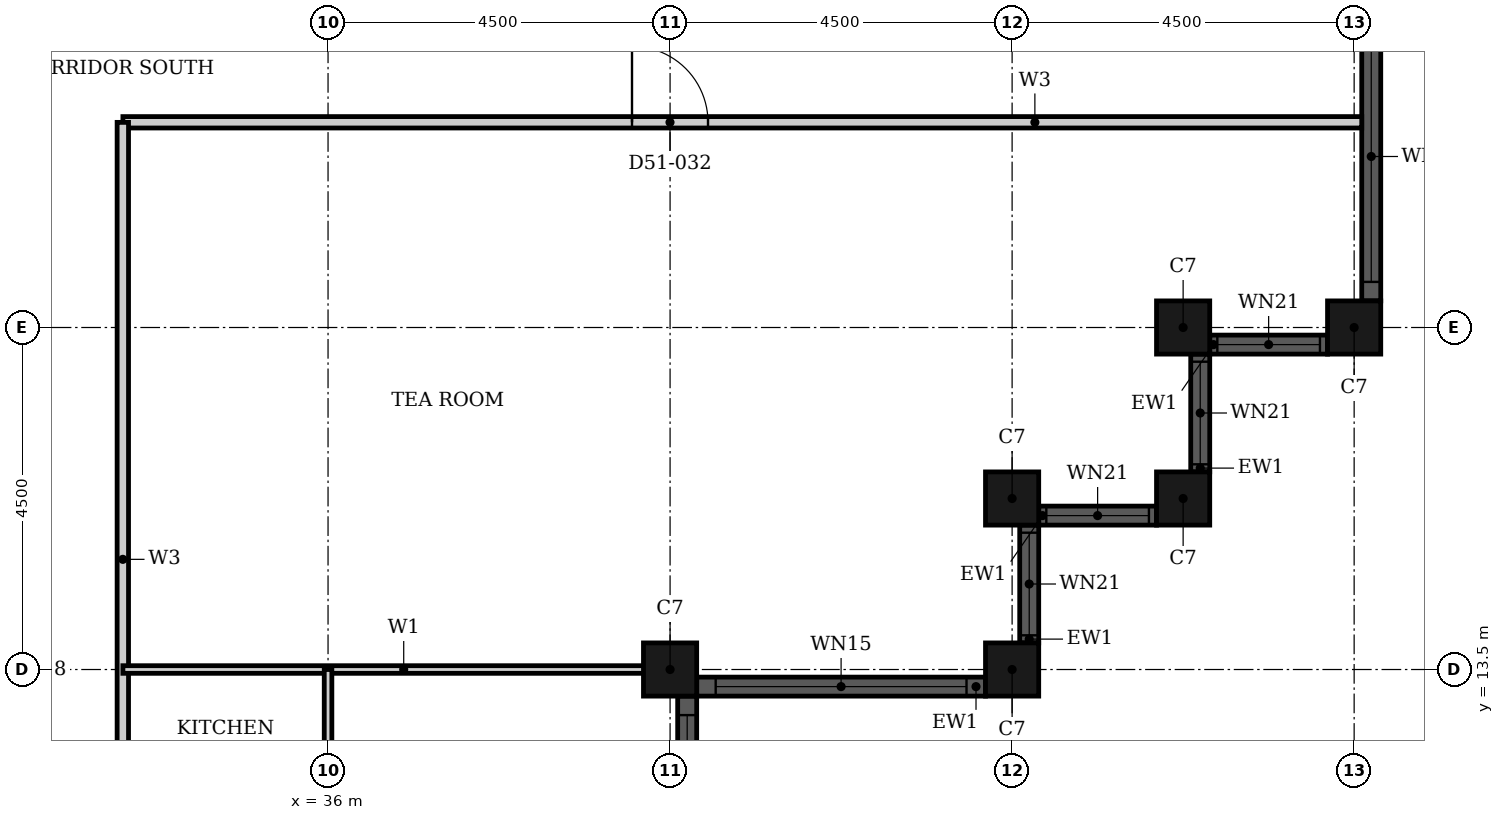
"""IFC4 building model, lengths in metres.
Left out: names, types, materials, properties, quantities, classifications, styles, units other than length and angle.
Written with IfcOpenShell. Run it as: python <this file> out.ifc"""

import sys

from ifc_helpers import new_model, si_unit, direction, frame, frame_2d, origin, origin_2d, place, context, subcontext, project, spatial, rectangle, hollow_rectangle, extrude, element, fill, save


model = new_model("IFC4")
c1 = context("Model", 3, precision=1e-05, world=origin(), true_north=direction((0.0, 1.0)))
c2 = subcontext(c1, "Body", "Model", "MODEL_VIEW")
j1 = project(units=[si_unit("LENGTHUNIT", "METRE"), si_unit("PLANEANGLEUNIT", "RADIAN")], contexts=[c1])
p1 = place(None, origin())
s1 = spatial("IfcSite", under=j1, at=p1, CompositionType="ELEMENT")
p2 = place(p1, origin())
s2 = spatial("IfcBuilding", under=s1, at=p2, CompositionType="ELEMENT")
p3 = place(p2, frame((0.0, 0.0, 203.5)))
s3 = spatial("IfcBuildingStorey", under=s2, at=p3, CompositionType="ELEMENT", Elevation=203.5)
for number, where, z_axis, x_axis in (
    (1, (40.5, 13.5, 0.0), (0.0, 0.0, 1.0), (1.0, 0.0, 0.0)),
    (2, (45.0, 13.5, 0.0), (0.0, 0.0, 1.0), (1.0, 0.0, 0.0)),
    (3, (45.0, 15.75, 0.0), (0.0, 0.0, 1.0), (1.0, 0.0, 0.0)),
    (4, (47.25, 15.75, 0.0), (0.0, 0.0, 1.0), (1.0, 0.0, 0.0)),
    (5, (47.25, 18.0, 0.0), (0.0, 0.0, 1.0), (1.0, 0.0, 0.0)),
    (6, (49.5, 18.0, 0.0), (0.0, 0.0, 1.0), (1.0, 0.0, 0.0)),
):
    element("IfcColumn", number, at=place(p3, frame(where, z_axis=z_axis, x_axis=x_axis)), inside=s3, PredefinedType="COLUMN", context=c2, shape_type="SweptSolid", body=[
        extrude(hollow_rectangle(XDim=0.7, YDim=0.7, WallThickness=0.022, at=origin_2d()), origin(), (0.0, 0.0, 1.0), 3.7),
    ])
p4 = place(p3, frame((40.85, 13.275, 0.0), z_axis=(0.0, 0.0, 1.0), x_axis=(1.0, 0.0, 0.0)))
e7 = element("IfcWall", 7, at=p4, inside=s3, PredefinedType="SOLIDWALL", context=c2, shape_type="SweptSolid", body=[
    extrude(rectangle(XDim=3.8, YDim=0.25, at=frame_2d((1.9, 0.0))), origin(), (0.0, 0.0, 1.0), 3.7),
])
p5 = place(p4, frame((0.25, 0.0, 0.45)))
e8 = element("IfcOpeningElement", 8, at=p5, cuts=e7, PredefinedType="OPENING", context=c2, shape_type="SweptSolid", body=[
    extrude(rectangle(XDim=3.3, YDim=2.3, at=frame_2d((1.65, 1.15))), frame((0.0, 0.135, 0.0), z_axis=(0.0, -1.0, 0.0), x_axis=(1.0, 0.0, 0.0)), (0.0, 0.0, 1.0), 0.27),
])
p6 = place(p3, frame((45.225, 13.85, 0.0), z_axis=(0.0, 0.0, 1.0), x_axis=(0.0, 1.0, 0.0)))
e9 = element("IfcWall", 9, at=p6, inside=s3, PredefinedType="SOLIDWALL", context=c2, shape_type="SweptSolid", body=[
    extrude(rectangle(XDim=1.55, YDim=0.25, at=frame_2d((0.775, 0.0))), origin(), (0.0, 0.0, 1.0), 3.7),
])
p7 = place(p6, frame((0.1, 0.0, 0.9)))
e10 = element("IfcOpeningElement", 10, at=p7, cuts=e9, PredefinedType="OPENING", context=c2, shape_type="SweptSolid", body=[
    extrude(rectangle(XDim=1.35, YDim=1.85, at=frame_2d((0.675, 0.925))), frame((0.0, 0.135, 0.0), z_axis=(0.0, -1.0, 0.0), x_axis=(1.0, 0.0, 0.0)), (0.0, 0.0, 1.0), 0.27),
])
p8 = place(p3, frame((45.35, 15.525, 0.0), z_axis=(0.0, 0.0, 1.0), x_axis=(1.0, 0.0, 0.0)))
e11 = element("IfcWall", 11, at=p8, inside=s3, PredefinedType="SOLIDWALL", context=c2, shape_type="SweptSolid", body=[
    extrude(rectangle(XDim=1.55, YDim=0.25, at=frame_2d((0.775, 0.0))), origin(), (0.0, 0.0, 1.0), 3.7),
])
p9 = place(p8, frame((0.1, 0.0, 0.9)))
e12 = element("IfcOpeningElement", 12, at=p9, cuts=e11, PredefinedType="OPENING", context=c2, shape_type="SweptSolid", body=[
    extrude(rectangle(XDim=1.35, YDim=1.85, at=frame_2d((0.675, 0.925))), frame((0.0, 0.135, 0.0), z_axis=(0.0, -1.0, 0.0), x_axis=(1.0, 0.0, 0.0)), (0.0, 0.0, 1.0), 0.27),
])
p10 = place(p3, frame((47.475, 16.1, 0.0), z_axis=(0.0, 0.0, 1.0), x_axis=(0.0, 1.0, 0.0)))
e13 = element("IfcWall", 13, at=p10, inside=s3, PredefinedType="SOLIDWALL", context=c2, shape_type="SweptSolid", body=[
    extrude(rectangle(XDim=1.55, YDim=0.25, at=frame_2d((0.775, 0.0))), origin(), (0.0, 0.0, 1.0), 3.7),
])
p11 = place(p10, frame((0.1, 0.0, 0.9)))
e14 = element("IfcOpeningElement", 14, at=p11, cuts=e13, PredefinedType="OPENING", context=c2, shape_type="SweptSolid", body=[
    extrude(rectangle(XDim=1.35, YDim=1.85, at=frame_2d((0.675, 0.925))), frame((0.0, 0.135, 0.0), z_axis=(0.0, -1.0, 0.0), x_axis=(1.0, 0.0, 0.0)), (0.0, 0.0, 1.0), 0.27),
])
p12 = place(p3, frame((47.6, 17.775, 0.0), z_axis=(0.0, 0.0, 1.0), x_axis=(1.0, 0.0, 0.0)))
e15 = element("IfcWall", 15, at=p12, inside=s3, PredefinedType="SOLIDWALL", context=c2, shape_type="SweptSolid", body=[
    extrude(rectangle(XDim=1.55, YDim=0.25, at=frame_2d((0.775, 0.0))), origin(), (0.0, 0.0, 1.0), 3.7),
])
p13 = place(p12, frame((0.1, 0.0, 0.9)))
e16 = element("IfcOpeningElement", 16, at=p13, cuts=e15, PredefinedType="OPENING", context=c2, shape_type="SweptSolid", body=[
    extrude(rectangle(XDim=1.35, YDim=1.85, at=frame_2d((0.675, 0.925))), frame((0.0, 0.135, 0.0), z_axis=(0.0, -1.0, 0.0), x_axis=(1.0, 0.0, 0.0)), (0.0, 0.0, 1.0), 0.27),
])
p14 = place(p3, frame((49.725, 18.35, 0.0), z_axis=(0.0, 0.0, 1.0), x_axis=(0.0, 1.0, 0.0)))
e17 = element("IfcWall", 17, at=p14, inside=s3, PredefinedType="SOLIDWALL", context=c2, shape_type="SweptSolid", body=[
    extrude(rectangle(XDim=8.3, YDim=0.25, at=frame_2d((4.15, 0.0))), origin(), (0.0, 0.0, 1.0), 3.7),
])
p15 = place(p14, frame((0.25, 0.0, 0.45)))
e18 = element("IfcOpeningElement", 18, at=p15, cuts=e17, PredefinedType="OPENING", context=c2, shape_type="SweptSolid", body=[
    extrude(rectangle(XDim=3.3, YDim=2.3, at=frame_2d((1.65, 1.15))), frame((0.0, 0.135, 0.0), z_axis=(0.0, -1.0, 0.0), x_axis=(1.0, 0.0, 0.0)), (0.0, 0.0, 1.0), 0.27),
])
p16 = place(p14, frame((4.75, 0.0, 0.45)))
e19 = element("IfcOpeningElement", 19, at=p16, cuts=e17, PredefinedType="OPENING", context=c2, shape_type="SweptSolid", body=[
    extrude(rectangle(XDim=3.3, YDim=2.3, at=frame_2d((1.65, 1.15))), frame((0.0, 0.135, 0.0), z_axis=(0.0, -1.0, 0.0), x_axis=(1.0, 0.0, 0.0)), (0.0, 0.0, 1.0), 0.27),
])
p17 = place(p3, frame((40.725, 4.85, 0.0), z_axis=(0.0, 0.0, 1.0), x_axis=(0.0, 1.0, 0.0)))
e20 = element("IfcWall", 20, at=p17, inside=s3, PredefinedType="SOLIDWALL", context=c2, shape_type="SweptSolid", body=[
    extrude(rectangle(XDim=8.3, YDim=0.25, at=frame_2d((4.15, 0.0))), origin(), (0.0, 0.0, 1.0), 3.7),
])
p18 = place(p17, frame((0.25, 0.0, 0.45)))
e21 = element("IfcOpeningElement", 21, at=p18, cuts=e20, PredefinedType="OPENING", context=c2, shape_type="SweptSolid", body=[
    extrude(rectangle(XDim=3.3, YDim=2.3, at=frame_2d((1.65, 1.15))), frame((0.0, 0.135, 0.0), z_axis=(0.0, -1.0, 0.0), x_axis=(1.0, 0.0, 0.0)), (0.0, 0.0, 1.0), 0.27),
])
p19 = place(p17, frame((4.75, 0.0, 0.45)))
e22 = element("IfcOpeningElement", 22, at=p19, cuts=e20, PredefinedType="OPENING", context=c2, shape_type="SweptSolid", body=[
    extrude(rectangle(XDim=3.3, YDim=2.3, at=frame_2d((1.65, 1.15))), frame((0.0, 0.135, 0.0), z_axis=(0.0, -1.0, 0.0), x_axis=(1.0, 0.0, 0.0)), (0.0, 0.0, 1.0), 0.27),
])
p20 = place(p3, frame((33.301, 20.7, 0.0), z_axis=(0.0, 0.0, 1.0), x_axis=(1.0, 0.0, 0.0)))
e23 = element("IfcWall", 23, at=p20, inside=s3, PredefinedType="PARTITIONING", context=c2, shape_type="SweptSolid", body=[
    extrude(rectangle(XDim=16.299, YDim=0.15, at=frame_2d((8.149, 0.0))), origin(), (0.0, 0.0, 1.0), 3.4),
])
p21 = place(p20, frame((6.698, 0.0, 0.0)))
e24 = element("IfcOpeningElement", 24, at=p21, cuts=e23, PredefinedType="OPENING", context=c2, shape_type="SweptSolid", body=[
    extrude(rectangle(XDim=1.0, YDim=2.1, at=frame_2d((0.5, 1.05))), frame((0.0, 0.085, 0.0), z_axis=(0.0, -1.0, 0.0), x_axis=(1.0, 0.0, 0.0)), (0.0, 0.0, 1.0), 0.17),
])
p22 = place(p3, frame((33.3, 6.9, 0.0), z_axis=(0.0, 0.0, 1.0), x_axis=(0.0, 1.0, 0.0)))
e25 = element("IfcWall", 25, at=p22, inside=s3, PredefinedType="PARTITIONING", context=c2, shape_type="SweptSolid", body=[
    extrude(rectangle(XDim=13.799, YDim=0.15, at=frame_2d((6.899, 0.0))), origin(), (0.0, 0.0, 1.0), 3.4),
])
p23 = place(p22, frame((1.3, 0.0, 0.0)))
e26 = element("IfcOpeningElement", 26, at=p23, cuts=e25, PredefinedType="OPENING", context=c2, shape_type="SweptSolid", body=[
    extrude(rectangle(XDim=1.0, YDim=2.2, at=frame_2d((0.5, 1.1))), frame((0.0, 0.085, 0.0), z_axis=(0.0, -1.0, 0.0), x_axis=(1.0, 0.0, 0.0)), (0.0, 0.0, 1.0), 0.17),
])
p24 = place(p3, frame((33.301, 13.5, 0.0), z_axis=(0.0, 0.0, 1.0), x_axis=(1.0, 0.0, 0.0)))
e27 = element("IfcWall", 27, at=p24, inside=s3, PredefinedType="PARTITIONING", context=c2, shape_type="SweptSolid", body=[
    extrude(rectangle(XDim=7.389, YDim=0.1, at=frame_2d((3.694, 0.0))), origin(), (0.0, 0.0, 1.0), 2.48),
])
p25 = place(p3, frame((36.0, 10.5, 0.0), z_axis=(0.0, 0.0, 1.0), x_axis=(0.0, 1.0, 0.0)))
e28 = element("IfcWall", 28, at=p25, inside=s3, PredefinedType="PARTITIONING", context=c2, shape_type="SweptSolid", body=[
    extrude(rectangle(XDim=3.0, YDim=0.1, at=frame_2d((1.5, 0.0))), origin(), (0.0, 0.0, 1.0), 2.68),
])
p26 = place(p25, frame((1.05, 0.0, 0.0)))
e29 = element("IfcOpeningElement", 29, at=p26, cuts=e28, PredefinedType="OPENING", context=c2, shape_type="SweptSolid", body=[
    extrude(rectangle(XDim=0.9, YDim=2.1, at=frame_2d((0.45, 1.05))), frame((0.0, 0.06, 0.0), z_axis=(0.0, -1.0, 0.0), x_axis=(1.0, 0.0, 0.0)), (0.0, 0.0, 1.0), 0.12),
])
p27 = place(p5, origin())
e30 = element("IfcWindow", 30, at=p27, inside=s3, PartitioningType="SINGLE_PANEL", PredefinedType="WINDOW", context=c2, shape_type="SweptSolid", body=[
    extrude(rectangle(XDim=3.3, YDim=2.3, at=frame_2d((1.65, 1.15))), frame((0.0, 0.03, 0.0), z_axis=(0.0, -1.0, 0.0), x_axis=(1.0, 0.0, 0.0)), (0.0, 0.0, 1.0), 0.06),
])
fill(e8, e30)
p28 = place(p7, origin())
e31 = element("IfcWindow", 31, at=p28, inside=s3, PartitioningType="SINGLE_PANEL", PredefinedType="WINDOW", context=c2, shape_type="SweptSolid", body=[
    extrude(rectangle(XDim=1.35, YDim=1.85, at=frame_2d((0.675, 0.925))), frame((0.0, 0.03, 0.0), z_axis=(0.0, -1.0, 0.0), x_axis=(1.0, 0.0, 0.0)), (0.0, 0.0, 1.0), 0.06),
])
fill(e10, e31)
p29 = place(p9, origin())
e32 = element("IfcWindow", 32, at=p29, inside=s3, PartitioningType="SINGLE_PANEL", PredefinedType="WINDOW", context=c2, shape_type="SweptSolid", body=[
    extrude(rectangle(XDim=1.35, YDim=1.85, at=frame_2d((0.675, 0.925))), frame((0.0, 0.03, 0.0), z_axis=(0.0, -1.0, 0.0), x_axis=(1.0, 0.0, 0.0)), (0.0, 0.0, 1.0), 0.06),
])
fill(e12, e32)
p30 = place(p11, origin())
e33 = element("IfcWindow", 33, at=p30, inside=s3, PartitioningType="SINGLE_PANEL", PredefinedType="WINDOW", context=c2, shape_type="SweptSolid", body=[
    extrude(rectangle(XDim=1.35, YDim=1.85, at=frame_2d((0.675, 0.925))), frame((0.0, 0.03, 0.0), z_axis=(0.0, -1.0, 0.0), x_axis=(1.0, 0.0, 0.0)), (0.0, 0.0, 1.0), 0.06),
])
fill(e14, e33)
p31 = place(p13, origin())
e34 = element("IfcWindow", 34, at=p31, inside=s3, PartitioningType="SINGLE_PANEL", PredefinedType="WINDOW", context=c2, shape_type="SweptSolid", body=[
    extrude(rectangle(XDim=1.35, YDim=1.85, at=frame_2d((0.675, 0.925))), frame((0.0, 0.03, 0.0), z_axis=(0.0, -1.0, 0.0), x_axis=(1.0, 0.0, 0.0)), (0.0, 0.0, 1.0), 0.06),
])
fill(e16, e34)
p32 = place(p15, origin())
e35 = element("IfcWindow", 35, at=p32, inside=s3, PartitioningType="SINGLE_PANEL", PredefinedType="WINDOW", context=c2, shape_type="SweptSolid", body=[
    extrude(rectangle(XDim=3.3, YDim=2.3, at=frame_2d((1.65, 1.15))), frame((0.0, 0.03, 0.0), z_axis=(0.0, -1.0, 0.0), x_axis=(1.0, 0.0, 0.0)), (0.0, 0.0, 1.0), 0.06),
])
fill(e18, e35)
p33 = place(p19, origin())
e36 = element("IfcWindow", 36, at=p33, inside=s3, PartitioningType="SINGLE_PANEL", PredefinedType="WINDOW", context=c2, shape_type="SweptSolid", body=[
    extrude(rectangle(XDim=3.3, YDim=2.3, at=frame_2d((1.65, 1.15))), frame((0.0, 0.03, 0.0), z_axis=(0.0, -1.0, 0.0), x_axis=(1.0, 0.0, 0.0)), (0.0, 0.0, 1.0), 0.06),
])
fill(e22, e36)
p34 = place(p21, origin())
e37 = element("IfcDoor", 37, at=p34, inside=s3, OperationType="SINGLE_SWING_RIGHT", PredefinedType="DOOR", context=c2, shape_type="SweptSolid", body=[
    extrude(rectangle(XDim=1.0, YDim=2.1, at=frame_2d((0.5, 1.05))), frame((0.0, 0.025, 0.0), z_axis=(0.0, -1.0, 0.0), x_axis=(1.0, 0.0, 0.0)), (0.0, 0.0, 1.0), 0.05),
])
fill(e24, e37)
save(model, sys.argv[1])
